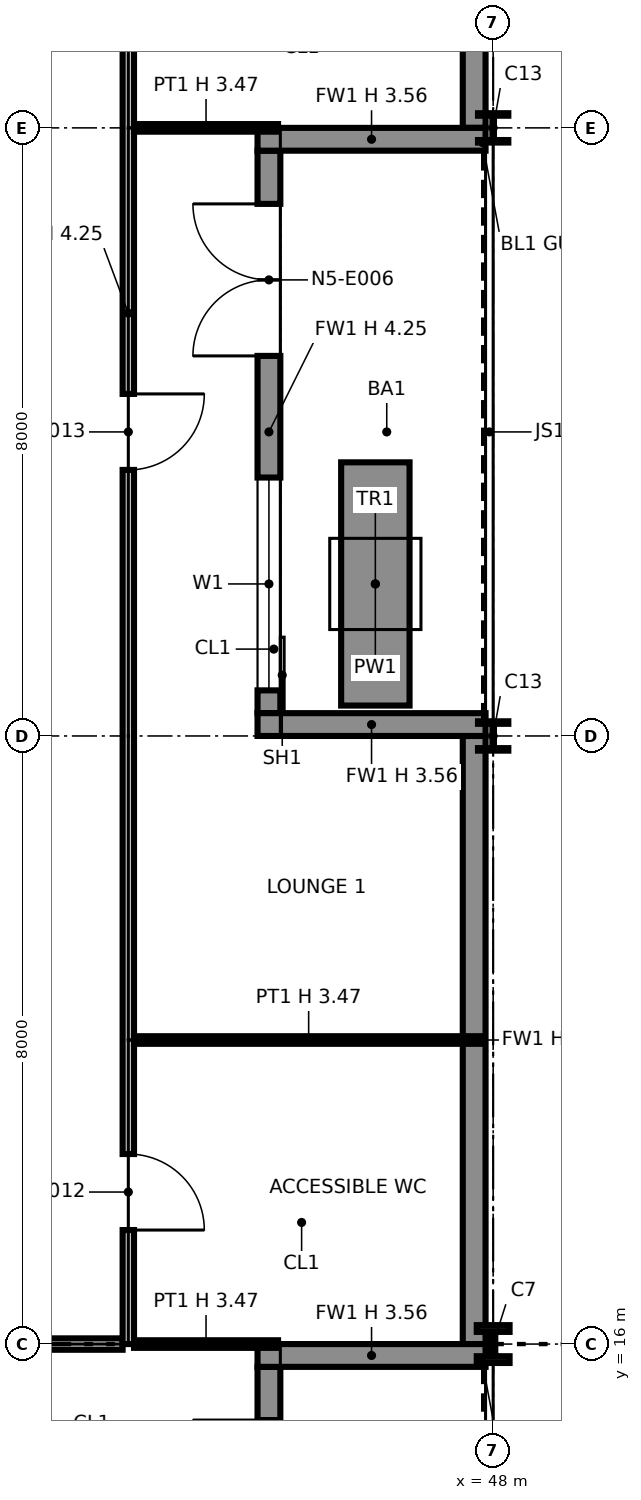
"""IFC4 building model, lengths in metres.
Left out: names, types, materials, properties, quantities, classifications, styles, units other than length and angle.
Written with IfcOpenShell. Run it as: python <this file> out.ifc"""

import sys

from ifc_helpers import new_model, si_unit, direction, frame, frame_2d, origin, origin_2d, place, context, subcontext, project, spatial, polyline, rectangle, i_section, outline, extrude, element, fill, save


model = new_model("IFC4")
c1 = context("Model", 3, precision=1e-05, world=origin(), true_north=direction((0.0, 1.0)))
c2 = subcontext(c1, "Body", "Model", "MODEL_VIEW")
j1 = project(units=[si_unit("LENGTHUNIT", "METRE"), si_unit("PLANEANGLEUNIT", "RADIAN")], contexts=[c1])
p1 = place(None, origin())
s1 = spatial("IfcSite", under=j1, at=p1, CompositionType="ELEMENT")
p2 = place(p1, origin())
s2 = spatial("IfcBuilding", under=s1, at=p2, CompositionType="ELEMENT")
p3 = place(p2, frame((0.0, 0.0, 92.0)))
s3 = spatial("IfcBuildingStorey", under=s2, at=p3, CompositionType="ELEMENT", Elevation=92.0)
p4 = place(p3, frame((48.0, 16.0, 0.0), z_axis=(0.0, 0.0, 1.0), x_axis=(1.0, 0.0, 0.0)))
e1 = element("IfcColumn", 1, at=p4, inside=s3, PredefinedType="COLUMN", context=c2, shape_type="SweptSolid", body=[
    extrude(i_section(OverallWidth=0.432, OverallDepth=0.498, WebThickness=0.056, FlangeThickness=0.089, at=origin_2d()), origin(), (0.0, 0.0, 1.0), 4.25),
])
for number, where, z_axis, x_axis in (
    (2, (48.0, 24.0, 0.0), (0.0, 0.0, 1.0), (1.0, 0.0, 0.0)),
    (3, (48.0, 32.0, 0.0), (0.0, 0.0, 1.0), (1.0, 0.0, 0.0)),
):
    element("IfcColumn", number, at=place(p3, frame(where, z_axis=z_axis, x_axis=x_axis)), inside=s3, PredefinedType="COLUMN", context=c2, shape_type="SweptSolid", body=[
        extrude(i_section(OverallWidth=0.399, OverallDepth=0.386, WebThickness=0.021, FlangeThickness=0.033, at=origin_2d()), origin(), (0.0, 0.0, 1.0), 4.25),
    ])
p5 = place(p3, frame((45.05, 8.3, 0.0), z_axis=(0.0, 0.0, 1.0), x_axis=(0.0, 1.0, 0.0)))
e4 = element("IfcWall", 4, at=p5, inside=s3, PredefinedType="SOLIDWALL", context=c2, shape_type="SweptSolid", body=[
    extrude(rectangle(XDim=7.4, YDim=0.3, at=frame_2d((3.7, 0.0))), origin(), (0.0, 0.0, 1.0), 4.25),
])
p6 = place(p5, frame((0.3, 0.0, 0.9)))
e5 = element("IfcOpeningElement", 5, at=p6, cuts=e4, PredefinedType="OPENING", context=c2, shape_type="SweptSolid", body=[
    extrude(rectangle(XDim=2.8, YDim=2.2, at=frame_2d((1.4, 1.1))), frame((0.0, 0.16, 0.0), z_axis=(0.0, -1.0, 0.0), x_axis=(1.0, 0.0, 0.0)), (0.0, 0.0, 1.0), 0.32),
])
p7 = place(p5, frame((4.7, 0.0, 0.0)))
e6 = element("IfcOpeningElement", 6, at=p7, cuts=e4, PredefinedType="OPENING", context=c2, shape_type="SweptSolid", body=[
    extrude(rectangle(XDim=2.0, YDim=2.4, at=frame_2d((1.0, 1.2))), frame((0.0, 0.16, 0.0), z_axis=(0.0, -1.0, 0.0), x_axis=(1.0, 0.0, 0.0)), (0.0, 0.0, 1.0), 0.32),
])
p8 = place(p3, frame((47.9, 15.85, 0.0), z_axis=(0.0, 0.0, 1.0), x_axis=(-1.0, 0.0, 0.0)))
e7 = element("IfcWall", 7, at=p8, inside=s3, PredefinedType="SOLIDWALL", context=c2, shape_type="SweptSolid", body=[
    extrude(rectangle(XDim=3.0, YDim=0.3, at=frame_2d((1.5, 0.0))), origin(), (0.0, 0.0, 1.0), 3.556),
])
p9 = place(p3, frame((47.75, 16.0, 0.0), z_axis=(0.0, 0.0, 1.0), x_axis=(0.0, 1.0, 0.0)))
e8 = element("IfcWall", 8, at=p9, inside=s3, PredefinedType="SOLIDWALL", context=c2, shape_type="SweptSolid", body=[
    extrude(rectangle(XDim=8.0, YDim=0.3, at=frame_2d((4.0, 0.0))), origin(), (0.0, 0.0, 1.0), 4.25),
])
p10 = place(p3, frame((45.05, 24.3, 0.0), z_axis=(0.0, 0.0, 1.0), x_axis=(0.0, 1.0, 0.0)))
e9 = element("IfcWall", 9, at=p10, inside=s3, PredefinedType="SOLIDWALL", context=c2, shape_type="SweptSolid", body=[
    extrude(rectangle(XDim=7.4, YDim=0.3, at=frame_2d((3.7, 0.0))), origin(), (0.0, 0.0, 1.0), 4.25),
])
p11 = place(p10, frame((0.3, 0.0, 0.9)))
e10 = element("IfcOpeningElement", 10, at=p11, cuts=e9, PredefinedType="OPENING", context=c2, shape_type="SweptSolid", body=[
    extrude(rectangle(XDim=2.8, YDim=2.2, at=frame_2d((1.4, 1.1))), frame((0.0, 0.16, 0.0), z_axis=(0.0, -1.0, 0.0), x_axis=(1.0, 0.0, 0.0)), (0.0, 0.0, 1.0), 0.32),
])
p12 = place(p10, frame((4.7, 0.0, 0.0)))
e11 = element("IfcOpeningElement", 11, at=p12, cuts=e9, PredefinedType="OPENING", context=c2, shape_type="SweptSolid", body=[
    extrude(rectangle(XDim=2.0, YDim=2.4, at=frame_2d((1.0, 1.2))), frame((0.0, 0.16, 0.0), z_axis=(0.0, -1.0, 0.0), x_axis=(1.0, 0.0, 0.0)), (0.0, 0.0, 1.0), 0.32),
])
for number, where, z_axis, x_axis in (
    (12, (47.9, 24.15, 0.0), (0.0, 0.0, 1.0), (-1.0, 0.0, 0.0)),
    (13, (47.9, 31.85, 0.0), (0.0, 0.0, 1.0), (-1.0, 0.0, 0.0)),
):
    element("IfcWall", number, at=place(p3, frame(where, z_axis=z_axis, x_axis=x_axis)), inside=s3, PredefinedType="SOLIDWALL", context=c2, shape_type="SweptSolid", body=[
        extrude(rectangle(XDim=3.0, YDim=0.3, at=frame_2d((1.5, 0.0))), origin(), (0.0, 0.0, 1.0), 3.556),
    ])
p13 = place(p3, frame((47.75, 32.0, 0.0), z_axis=(0.0, 0.0, 1.0), x_axis=(0.0, 1.0, 0.0)))
e14 = element("IfcWall", 14, at=p13, inside=s3, PredefinedType="SOLIDWALL", context=c2, shape_type="SweptSolid", body=[
    extrude(rectangle(XDim=9.6, YDim=0.3, at=frame_2d((4.8, 0.0))), origin(), (0.0, 0.0, 1.0), 4.25),
])
p14 = place(p3, frame((46.45, 24.4, 0.0), z_axis=(0.0, 0.0, 1.0), x_axis=(0.0, 1.0, 0.0)))
e15 = element("IfcWall", 15, at=p14, inside=s3, PredefinedType="SOLIDWALL", context=c2, shape_type="SweptSolid", body=[
    extrude(rectangle(XDim=3.2, YDim=0.9, at=frame_2d((1.6, 0.0))), origin(), (0.0, 0.0, 1.0), 0.6),
])
p15 = place(p3, frame((40.03, 16.0, 0.0), z_axis=(0.0, 0.0, 1.0), x_axis=(1.0, 0.0, 0.0)))
e16 = element("IfcWall", 16, at=p15, inside=s3, PredefinedType="PARTITIONING", context=c2, shape_type="SweptSolid", body=[
    extrude(rectangle(XDim=3.095, YDim=0.15, at=frame_2d((1.547, 0.0))), origin(), (0.0, 0.0, 1.0), 3.47),
])
p16 = place(p15, frame((2.07, 0.0, 0.0), z_axis=(0.0, 0.0, 1.0), x_axis=(-1.0, 0.0, 0.0)))
e17 = element("IfcOpeningElement", 17, at=p16, cuts=e16, PredefinedType="OPENING", context=c2, shape_type="SweptSolid", body=[
    extrude(rectangle(XDim=1.0, YDim=2.1, at=frame_2d((0.5, 1.05))), frame((0.0, 0.085, 0.0), z_axis=(0.0, -1.0, 0.0), x_axis=(1.0, 0.0, 0.0)), (0.0, 0.0, 1.0), 0.17),
])
p17 = place(p3, frame((43.275, 16.0, 0.0), z_axis=(0.0, 0.0, 1.0), x_axis=(1.0, 0.0, 0.0)))
e18 = element("IfcWall", 18, at=p17, inside=s3, PredefinedType="PARTITIONING", context=c2, shape_type="SweptSolid", body=[
    extrude(rectangle(XDim=1.895, YDim=0.1, at=frame_2d((0.948, 0.0))), origin(), (0.0, 0.0, 1.0), 3.47),
])
p18 = place(p3, frame((43.2, 16.0, 0.0), z_axis=(0.0, 0.0, 1.0), x_axis=(0.0, 1.0, 0.0)))
e19 = element("IfcWall", 19, at=p18, inside=s3, PredefinedType="PARTITIONING", context=c2, shape_type="SweptSolid", body=[
    extrude(outline(polyline([(0.0, 0.0), (27.125, 0.0), (27.125, 4.25), (24.3, 4.25), (24.298, 3.47), (23.702, 3.47), (23.7, 4.25), (20.3, 4.25), (20.298, 3.47), (19.702, 3.47), (19.7, 4.25), (16.3, 4.25), (16.298, 3.47), (15.702, 3.47), (15.7, 4.25), (12.3, 4.25), (12.298, 3.47), (11.702, 3.47), (11.7, 4.25), (8.3, 4.25), (8.298, 3.47), (7.702, 3.47), (7.7, 4.25), (4.3, 4.25), (4.298, 3.47), (3.702, 3.47), (3.7, 4.25), (0.0, 4.25), (0.0, 0.0)])), frame((0.0, 0.075, 0.0), z_axis=(0.0, -1.0, 0.0), x_axis=(1.0, 0.0, 0.0)), (0.0, 0.0, 1.0), 0.15),
])
p19 = place(p18, frame((2.5, 0.0, 0.0), z_axis=(0.0, 0.0, 1.0), x_axis=(-1.0, 0.0, 0.0)))
e20 = element("IfcOpeningElement", 20, at=p19, cuts=e19, PredefinedType="OPENING", context=c2, shape_type="SweptSolid", body=[
    extrude(rectangle(XDim=1.0, YDim=2.1, at=frame_2d((0.5, 1.05))), frame((0.0, 0.085, 0.0), z_axis=(0.0, -1.0, 0.0), x_axis=(1.0, 0.0, 0.0)), (0.0, 0.0, 1.0), 0.17),
])
p20 = place(p18, frame((12.5, 0.0, 0.0), z_axis=(0.0, 0.0, 1.0), x_axis=(-1.0, 0.0, 0.0)))
e21 = element("IfcOpeningElement", 21, at=p20, cuts=e19, PredefinedType="OPENING", context=c2, shape_type="SweptSolid", body=[
    extrude(rectangle(XDim=1.0, YDim=2.1, at=frame_2d((0.5, 1.05))), frame((0.0, 0.085, 0.0), z_axis=(0.0, -1.0, 0.0), x_axis=(1.0, 0.0, 0.0)), (0.0, 0.0, 1.0), 0.17),
])
p21 = place(p18, frame((18.5, 0.0, 0.0), z_axis=(0.0, 0.0, 1.0), x_axis=(-1.0, 0.0, 0.0)))
e22 = element("IfcOpeningElement", 22, at=p21, cuts=e19, PredefinedType="OPENING", context=c2, shape_type="SweptSolid", body=[
    extrude(rectangle(XDim=1.0, YDim=2.1, at=frame_2d((0.5, 1.05))), frame((0.0, 0.085, 0.0), z_axis=(0.0, -1.0, 0.0), x_axis=(1.0, 0.0, 0.0)), (0.0, 0.0, 1.0), 0.17),
])
p22 = place(p18, frame((22.5, 0.0, 0.0), z_axis=(0.0, 0.0, 1.0), x_axis=(-1.0, 0.0, 0.0)))
e23 = element("IfcOpeningElement", 23, at=p22, cuts=e19, PredefinedType="OPENING", context=c2, shape_type="SweptSolid", body=[
    extrude(rectangle(XDim=1.0, YDim=2.1, at=frame_2d((0.5, 1.05))), frame((0.0, 0.085, 0.0), z_axis=(0.0, -1.0, 0.0), x_axis=(1.0, 0.0, 0.0)), (0.0, 0.0, 1.0), 0.17),
])
p23 = place(p18, frame((26.1, 0.0, 0.0), z_axis=(0.0, 0.0, 1.0), x_axis=(-1.0, 0.0, 0.0)))
e24 = element("IfcOpeningElement", 24, at=p23, cuts=e19, PredefinedType="OPENING", context=c2, shape_type="SweptSolid", body=[
    extrude(rectangle(XDim=1.0, YDim=2.1, at=frame_2d((0.5, 1.05))), frame((0.0, 0.085, 0.0), z_axis=(0.0, -1.0, 0.0), x_axis=(1.0, 0.0, 0.0)), (0.0, 0.0, 1.0), 0.17),
])
p24 = place(p3, frame((43.275, 20.0, 0.0), z_axis=(0.0, 0.0, 1.0), x_axis=(1.0, 0.0, 0.0)))
e25 = element("IfcWall", 25, at=p24, inside=s3, PredefinedType="PARTITIONING", context=c2, shape_type="SweptSolid", body=[
    extrude(rectangle(XDim=4.595, YDim=0.1, at=frame_2d((2.298, 0.0))), origin(), (0.0, 0.0, 1.0), 3.47),
])
p25 = place(p3, frame((43.275, 32.0, 0.0), z_axis=(0.0, 0.0, 1.0), x_axis=(1.0, 0.0, 0.0)))
e26 = element("IfcWall", 26, at=p25, inside=s3, PredefinedType="PARTITIONING", context=c2, shape_type="SweptSolid", body=[
    extrude(rectangle(XDim=1.895, YDim=0.1, at=frame_2d((0.948, 0.0))), origin(), (0.0, 0.0, 1.0), 3.47),
])
p26 = place(p11, origin())
e27 = element("IfcWindow", 27, at=p26, inside=s3, PartitioningType="SINGLE_PANEL", PredefinedType="WINDOW", context=c2, shape_type="SweptSolid", body=[
    extrude(rectangle(XDim=2.8, YDim=2.2, at=frame_2d((1.4, 1.1))), frame((0.0, 0.03, 0.0), z_axis=(0.0, -1.0, 0.0), x_axis=(1.0, 0.0, 0.0)), (0.0, 0.0, 1.0), 0.06),
])
fill(e10, e27)
p27 = place(p12, origin())
e28 = element("IfcDoor", 28, at=p27, inside=s3, OperationType="DOUBLE_DOOR_SINGLE_SWING", PredefinedType="DOOR", context=c2, shape_type="SweptSolid", body=[
    extrude(rectangle(XDim=2.0, YDim=2.4, at=frame_2d((1.0, 1.2))), frame((0.0, 0.025, 0.0), z_axis=(0.0, -1.0, 0.0), x_axis=(1.0, 0.0, 0.0)), (0.0, 0.0, 1.0), 0.05),
])
fill(e11, e28)
p28 = place(p19, origin())
e29 = element("IfcDoor", 29, at=p28, inside=s3, OperationType="SINGLE_SWING_RIGHT", PredefinedType="DOOR", context=c2, shape_type="SweptSolid", body=[
    extrude(rectangle(XDim=1.0, YDim=2.1, at=frame_2d((0.5, 1.05))), frame((0.0, 0.025, 0.0), z_axis=(0.0, -1.0, 0.0), x_axis=(1.0, 0.0, 0.0)), (0.0, 0.0, 1.0), 0.05),
])
fill(e20, e29)
p29 = place(p20, origin())
e30 = element("IfcDoor", 30, at=p29, inside=s3, OperationType="SINGLE_SWING_LEFT", PredefinedType="DOOR", context=c2, shape_type="SweptSolid", body=[
    extrude(rectangle(XDim=1.0, YDim=2.1, at=frame_2d((0.5, 1.05))), frame((0.0, 0.025, 0.0), z_axis=(0.0, -1.0, 0.0), x_axis=(1.0, 0.0, 0.0)), (0.0, 0.0, 1.0), 0.05),
])
fill(e21, e30)
save(model, sys.argv[1])
